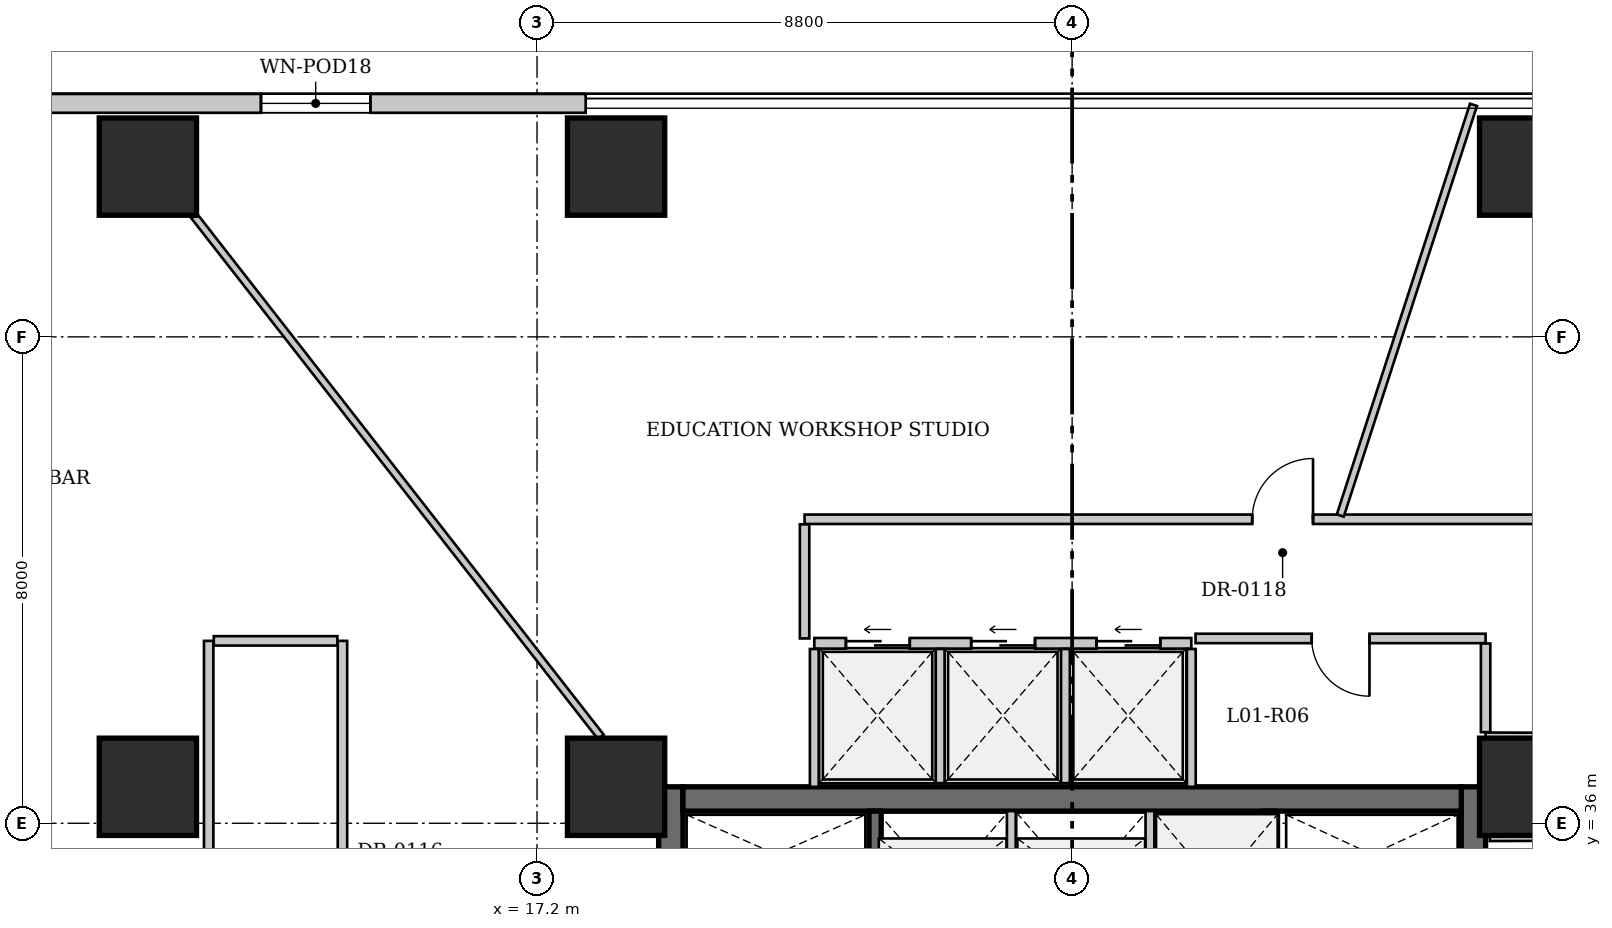
"""IFC4 building model, lengths in metres.
Left out: names, types, materials, properties, quantities, classifications, styles, units other than length and angle.
Written with IfcOpenShell. Run it as: python <this file> out.ifc"""

import sys

from ifc_helpers import new_model, si_unit, direction, frame, frame_2d, origin, origin_2d, place, context, subcontext, project, spatial, rectangle, extrude, source, transform, mapped, element, fill, save


model = new_model("IFC4")
c1 = context("Model", 3, precision=1e-05, world=origin(), true_north=direction((0.0, 1.0)))
c2 = subcontext(c1, "Body", "Model", "MODEL_VIEW")
j1 = project(units=[si_unit("LENGTHUNIT", "METRE"), si_unit("PLANEANGLEUNIT", "RADIAN")], contexts=[c1])
p1 = place(None, origin())
s1 = spatial("IfcSite", under=j1, at=p1, CompositionType="ELEMENT")
p2 = place(p1, origin())
s2 = spatial("IfcBuilding", under=s1, at=p2, CompositionType="ELEMENT")
p3 = place(p2, frame((0.0, 0.0, 5.2)))
s3 = spatial("IfcBuildingStorey", under=s2, at=p3, CompositionType="ELEMENT", Elevation=5.2)
for number, where, z_axis, x_axis in (
    (1, (10.8, 46.8, 0.0), (0.0, 0.0, 1.0), (1.0, 0.0, 0.0)),
    (2, (18.5, 46.8, 0.0), (0.0, 0.0, 1.0), (1.0, 0.0, 0.0)),
    (3, (33.5, 46.8, 0.0), (0.0, 0.0, 1.0), (1.0, 0.0, 0.0)),
    (4, (10.8, 36.6, 0.0), (0.0, 0.0, 1.0), (1.0, 0.0, 0.0)),
    (5, (18.5, 36.6, 0.0), (0.0, 0.0, 1.0), (1.0, 0.0, 0.0)),
    (6, (33.5, 36.6, 0.0), (0.0, 0.0, 1.0), (1.0, 0.0, 0.0)),
):
    element("IfcColumn", number, at=place(p3, frame(where, z_axis=z_axis, x_axis=x_axis)), inside=s3, PredefinedType="COLUMN", context=c2, shape_type="SweptSolid", body=[
        extrude(rectangle(XDim=1.6, YDim=1.6, at=origin_2d()), origin(), (0.0, 0.0, 1.0), 4.3),
    ])
p4 = place(p3, frame((0.16, 47.84, 0.0), z_axis=(0.0, 0.0, 1.0), x_axis=(1.0, 0.0, 0.0)))
e7 = element("IfcWall", 7, at=p4, inside=s3, PredefinedType="SOLIDWALL", context=c2, shape_type="SweptSolid", body=[
    extrude(rectangle(XDim=17.84, YDim=0.31, at=frame_2d((8.92, 0.0))), origin(), (0.0, 0.0, 1.0), 4.05),
])
p5 = place(p4, frame((7.0, 0.0, 0.95)))
e8 = element("IfcOpeningElement", 8, at=p5, cuts=e7, PredefinedType="OPENING", context=c2, shape_type="SweptSolid", body=[
    extrude(rectangle(XDim=1.8, YDim=2.4, at=frame_2d((0.9, 1.2))), frame((0.0, 0.165, 0.0), z_axis=(0.0, -1.0, 0.0), x_axis=(1.0, 0.0, 0.0)), (0.0, 0.0, 1.0), 0.33),
])
p6 = place(p4, frame((12.5, 0.0, 0.95)))
e9 = element("IfcOpeningElement", 9, at=p6, cuts=e7, PredefinedType="OPENING", context=c2, shape_type="SweptSolid", body=[
    extrude(rectangle(XDim=1.8, YDim=2.4, at=frame_2d((0.9, 1.2))), frame((0.0, 0.165, 0.0), z_axis=(0.0, -1.0, 0.0), x_axis=(1.0, 0.0, 0.0)), (0.0, 0.0, 1.0), 0.33),
])
p7 = place(p3, frame((19.4, 25.8, 0.0), z_axis=(0.0, 0.0, 1.0), x_axis=(0.0, 1.0, 0.0)))
e10 = element("IfcWall", 10, at=p7, inside=s3, PredefinedType="SHEAR", context=c2, shape_type="SweptSolid", body=[
    extrude(rectangle(XDim=10.8, YDim=0.4, at=frame_2d((5.4, 0.0))), origin(), (0.0, 0.0, 1.0), 4.6),
])
p8 = place(p3, frame((32.6, 36.6, 0.0), z_axis=(0.0, 0.0, 1.0), x_axis=(0.0, -1.0, 0.0)))
e11 = element("IfcWall", 11, at=p8, inside=s3, PredefinedType="SHEAR", context=c2, shape_type="SweptSolid", body=[
    extrude(rectangle(XDim=10.8, YDim=0.4, at=frame_2d((5.4, 0.0))), origin(), (0.0, 0.0, 1.0), 4.6),
])
p9 = place(p8, frame((3.7, 0.0, 0.0)))
e12 = element("IfcOpeningElement", 12, at=p9, cuts=e11, PredefinedType="OPENING", context=c2, shape_type="SweptSolid", body=[
    extrude(rectangle(XDim=1.05, YDim=2.15, at=frame_2d((0.525, 1.075))), frame((0.0, 0.21, 0.0), z_axis=(0.0, -1.0, 0.0), x_axis=(1.0, 0.0, 0.0)), (0.0, 0.0, 1.0), 0.42),
])
p10 = place(p3, frame((19.6, 36.4, 0.0), z_axis=(0.0, 0.0, 1.0), x_axis=(1.0, 0.0, 0.0)))
e13 = element("IfcWall", 13, at=p10, inside=s3, PredefinedType="SHEAR", context=c2, shape_type="SweptSolid", body=[
    extrude(rectangle(XDim=12.8, YDim=0.4, at=frame_2d((6.4, 0.0))), origin(), (0.0, 0.0, 1.0), 4.6),
])
p11 = place(p3, frame((22.76, 26.2, 0.0), z_axis=(0.0, 0.0, 1.0), x_axis=(0.0, 1.0, 0.0)))
e14 = element("IfcWall", 14, at=p11, inside=s3, PredefinedType="SHEAR", context=c2, shape_type="SweptSolid", body=[
    extrude(rectangle(XDim=10.0, YDim=0.2, at=frame_2d((5.0, 0.0))), origin(), (0.0, 0.0, 1.0), 4.6),
])
p12 = place(p3, frame((29.24, 26.2, 0.0), z_axis=(0.0, 0.0, 1.0), x_axis=(0.0, 1.0, 0.0)))
e15 = element("IfcWall", 15, at=p12, inside=s3, PredefinedType="SHEAR", context=c2, shape_type="SweptSolid", body=[
    extrude(rectangle(XDim=10.0, YDim=0.2, at=frame_2d((5.0, 0.0))), origin(), (0.0, 0.0, 1.0), 4.6),
])
p13 = place(p12, frame((5.65, 0.0, 0.0)))
e16 = element("IfcOpeningElement", 16, at=p13, cuts=e15, PredefinedType="OPENING", context=c2, shape_type="SweptSolid", body=[
    extrude(rectangle(XDim=1.05, YDim=2.15, at=frame_2d((0.525, 1.075))), frame((0.0, 0.11, 0.0), z_axis=(0.0, -1.0, 0.0), x_axis=(1.0, 0.0, 0.0)), (0.0, 0.0, 1.0), 0.22),
])
for number, where, z_axis, x_axis in (
    (17, (25.0, 33.743, 0.0), (0.0, 0.0, 1.0), (0.0, 1.0, 0.0)),
    (18, (27.28, 33.743, 0.0), (0.0, 0.0, 1.0), (0.0, 1.0, 0.0)),
):
    element("IfcWall", number, at=place(p3, frame(where, z_axis=z_axis, x_axis=x_axis)), inside=s3, PredefinedType="SOLIDWALL", context=c2, shape_type="SweptSolid", body=[
        extrude(rectangle(XDim=2.457, YDim=0.145, at=frame_2d((1.228, 0.0))), origin(), (0.0, 0.0, 1.0), 4.3),
    ])
p14 = place(p3, frame((21.76, 38.96, 0.0), z_axis=(0.0, 0.0, 1.0), x_axis=(1.0, 0.0, 0.0)))
e19 = element("IfcWall", 19, at=p14, inside=s3, PredefinedType="SOLIDWALL", context=c2, shape_type="SweptSolid", body=[
    extrude(rectangle(XDim=6.2, YDim=0.175, at=frame_2d((3.1, 0.0))), origin(), (0.0, 0.0, 1.0), 4.3),
])
p15 = place(p14, frame((0.52, 0.0, 0.0)))
e20 = element("IfcOpeningElement", 20, at=p15, cuts=e19, PredefinedType="OPENING", context=c2, shape_type="SweptSolid", body=[
    extrude(rectangle(XDim=1.05, YDim=2.15, at=frame_2d((0.525, 1.075))), frame((0.0, 0.098, 0.0), z_axis=(0.0, -1.0, 0.0), x_axis=(1.0, 0.0, 0.0)), (0.0, 0.0, 1.0), 0.195),
])
p16 = place(p14, frame((2.58, 0.0, 0.0)))
e21 = element("IfcOpeningElement", 21, at=p16, cuts=e19, PredefinedType="OPENING", context=c2, shape_type="SweptSolid", body=[
    extrude(rectangle(XDim=1.05, YDim=2.15, at=frame_2d((0.525, 1.075))), frame((0.0, 0.098, 0.0), z_axis=(0.0, -1.0, 0.0), x_axis=(1.0, 0.0, 0.0)), (0.0, 0.0, 1.0), 0.195),
])
p17 = place(p14, frame((4.64, 0.0, 0.0)))
e22 = element("IfcOpeningElement", 22, at=p17, cuts=e19, PredefinedType="OPENING", context=c2, shape_type="SweptSolid", body=[
    extrude(rectangle(XDim=1.05, YDim=2.15, at=frame_2d((0.525, 1.075))), frame((0.0, 0.098, 0.0), z_axis=(0.0, -1.0, 0.0), x_axis=(1.0, 0.0, 0.0)), (0.0, 0.0, 1.0), 0.195),
])
for number, where, z_axis, x_axis in (
    (23, (21.76, 36.6, 0.0), (0.0, 0.0, 1.0), (0.0, 1.0, 0.0)),
    (24, (27.96, 36.6, 0.0), (0.0, 0.0, 1.0), (0.0, 1.0, 0.0)),
):
    element("IfcWall", number, at=place(p3, frame(where, z_axis=z_axis, x_axis=x_axis)), inside=s3, PredefinedType="SOLIDWALL", context=c2, shape_type="SweptSolid", body=[
        extrude(rectangle(XDim=2.266, YDim=0.145, at=frame_2d((1.133, 0.0))), origin(), (0.0, 0.0, 1.0), 4.3),
    ])
for number, where, z_axis, x_axis in (
    (25, (23.83, 36.66, 0.0), (0.0, 0.0, 1.0), (0.0, 1.0, 0.0)),
    (26, (25.89, 36.66, 0.0), (0.0, 0.0, 1.0), (0.0, 1.0, 0.0)),
):
    element("IfcWall", number, at=place(p3, frame(where, z_axis=z_axis, x_axis=x_axis)), inside=s3, PredefinedType="SOLIDWALL", context=c2, shape_type="SweptSolid", body=[
        extrude(rectangle(XDim=2.207, YDim=0.145, at=frame_2d((1.103, 0.0))), origin(), (0.0, 0.0, 1.0), 4.3),
    ])
p18 = place(p3, frame((14.0, 39.0, 0.0), z_axis=(0.0, 0.0, 1.0), x_axis=(0.0, -1.0, 0.0)))
e27 = element("IfcWall", 27, at=p18, inside=s3, PredefinedType="PARTITIONING", context=c2, shape_type="SweptSolid", body=[
    extrude(rectangle(XDim=12.88, YDim=0.155, at=frame_2d((6.44, 0.0))), origin(), (0.0, 0.0, 1.0), 4.3),
])
p19 = place(p18, frame((4.477, 0.0, 0.0)))
e28 = element("IfcOpeningElement", 28, at=p19, cuts=e27, PredefinedType="OPENING", context=c2, shape_type="SweptSolid", body=[
    extrude(rectangle(XDim=1.0, YDim=2.15, at=frame_2d((0.5, 1.075))), frame((0.0, 0.087, 0.0), z_axis=(0.0, -1.0, 0.0), x_axis=(1.0, 0.0, 0.0)), (0.0, 0.0, 1.0), 0.175),
])
p20 = place(p3, frame((32.8, 39.04, 0.0), z_axis=(0.0, 0.0, 1.0), x_axis=(-1.0, 0.0, 0.0)))
e29 = element("IfcWall", 29, at=p20, inside=s3, PredefinedType="PARTITIONING", context=c2, shape_type="SweptSolid", body=[
    extrude(rectangle(XDim=4.77, YDim=0.155, at=frame_2d((2.385, 0.0))), origin(), (0.0, 0.0, 1.0), 4.3),
])
p21 = place(p20, frame((1.91, 0.0, 0.0)))
e30 = element("IfcOpeningElement", 30, at=p21, cuts=e29, PredefinedType="OPENING", context=c2, shape_type="SweptSolid", body=[
    extrude(rectangle(XDim=0.95, YDim=2.15, at=frame_2d((0.475, 1.075))), frame((0.0, 0.087, 0.0), z_axis=(0.0, -1.0, 0.0), x_axis=(1.0, 0.0, 0.0)), (0.0, 0.0, 1.0), 0.175),
])
p22 = place(p3, frame((21.6, 41.0, 0.0), z_axis=(0.0, 0.0, 1.0), x_axis=(1.0, 0.0, 0.0)))
e31 = element("IfcWall", 31, at=p22, inside=s3, PredefinedType="PARTITIONING", context=c2, shape_type="SweptSolid", body=[
    extrude(rectangle(XDim=14.2, YDim=0.155, at=frame_2d((7.1, 0.0))), origin(), (0.0, 0.0, 1.0), 4.3),
])
p23 = place(p22, frame((7.362, 0.0, 0.0)))
e32 = element("IfcOpeningElement", 32, at=p23, cuts=e31, PredefinedType="OPENING", context=c2, shape_type="SweptSolid", body=[
    extrude(rectangle(XDim=1.0, YDim=2.15, at=frame_2d((0.5, 1.075))), frame((0.0, 0.087, 0.0), z_axis=(0.0, -1.0, 0.0), x_axis=(1.0, 0.0, 0.0)), (0.0, 0.0, 1.0), 0.175),
])
p24 = place(p3, frame((11.8, 26.12, 0.0), z_axis=(0.0, 0.0, 1.0), x_axis=(0.0, 1.0, 0.0)))
e33 = element("IfcWall", 33, at=p24, inside=s3, PredefinedType="PARTITIONING", context=c2, shape_type="SweptSolid", body=[
    extrude(rectangle(XDim=12.88, YDim=0.155, at=frame_2d((6.44, 0.0))), origin(), (0.0, 0.0, 1.0), 4.3),
])
p25 = place(p3, frame((11.884, 39.0, 0.0), z_axis=(0.0, 0.0, 1.0), x_axis=(1.0, 0.0, 0.0)))
e34 = element("IfcWall", 34, at=p25, inside=s3, PredefinedType="PARTITIONING", context=c2, shape_type="SweptSolid", body=[
    extrude(rectangle(XDim=2.033, YDim=0.155, at=frame_2d((1.017, 0.0))), origin(), (0.0, 0.0, 1.0), 4.3),
])
p26 = place(p3, frame((32.87, 35.785, 0.0), z_axis=(0.0, 0.0, 1.0), x_axis=(0.99999584892, 0.002881343971, 0.0)))
e35 = element("IfcWall", 35, at=p26, inside=s3, PredefinedType="PARTITIONING", context=c2, shape_type="SweptSolid", body=[
    extrude(rectangle(XDim=1.44, YDim=0.155, at=frame_2d((0.72, 0.0))), origin(), (0.0, 0.0, 1.0), 4.3),
])
p27 = place(p3, frame((34.228, 37.41, 0.0), z_axis=(0.0, 0.0, 1.0), x_axis=(-0.999993554729, 0.003590334185, 0.0)))
e36 = element("IfcWall", 36, at=p27, inside=s3, PredefinedType="PARTITIONING", context=c2, shape_type="SweptSolid", body=[
    extrude(rectangle(XDim=1.428, YDim=0.155, at=frame_2d((0.714, 0.0))), origin(), (0.0, 0.0, 1.0), 4.3),
])
p28 = place(p3, frame((32.8, 37.499, 0.0), z_axis=(0.0, 0.0, 1.0), x_axis=(0.0, 1.0, 0.0)))
e37 = element("IfcWall", 37, at=p28, inside=s3, PredefinedType="PARTITIONING", context=c2, shape_type="SweptSolid", body=[
    extrude(rectangle(XDim=1.458, YDim=0.155, at=frame_2d((0.729, 0.0))), origin(), (0.0, 0.0, 1.0), 4.3),
])
p29 = place(p3, frame((21.6, 39.04, 0.0), z_axis=(0.0, 0.0, 1.0), x_axis=(0.0, 1.0, 0.0)))
e38 = element("IfcWall", 38, at=p29, inside=s3, PredefinedType="PARTITIONING", context=c2, shape_type="SweptSolid", body=[
    extrude(rectangle(XDim=1.876, YDim=0.155, at=frame_2d((0.938, 0.0))), origin(), (0.0, 0.0, 1.0), 4.3),
])
p30 = place(p3, frame((30.41, 41.062, 0.0), z_axis=(0.0, 0.0, 1.0), x_axis=(0.308512265312, 0.951220364664, 0.0)))
e39 = element("IfcWall", 39, at=p30, inside=s3, PredefinedType="PARTITIONING", context=c2, shape_type="SweptSolid", body=[
    extrude(rectangle(XDim=7.101, YDim=0.12, at=frame_2d((3.55, 0.0))), origin(), (0.0, 0.0, 1.0), 4.3),
])
p31 = place(p3, frame((18.25, 37.42, 0.0), z_axis=(0.0, 0.0, 1.0), x_axis=(-0.615334161376, 0.788266369855, 0.0)))
e40 = element("IfcWall", 40, at=p31, inside=s3, PredefinedType="PARTITIONING", context=c2, shape_type="SweptSolid", body=[
    extrude(rectangle(XDim=10.872, YDim=0.12, at=frame_2d((5.436, 0.0))), origin(), (0.0, 0.0, 1.0), 4.3),
])
m1 = source(origin(), c2, "Body", "SweptSolid", [
    extrude(rectangle(XDim=1.8, YDim=2.4, at=frame_2d((0.9, 1.2))), frame((0.0, 0.03, 0.0), z_axis=(0.0, -1.0, 0.0), x_axis=(1.0, 0.0, 0.0)), (0.0, 0.0, 1.0), 0.06),
])
p32 = place(p6, origin())
e41 = element("IfcWindow", 41, at=p32, inside=s3, PartitioningType="SINGLE_PANEL", PredefinedType="WINDOW", context=c2, shape_type="MappedRepresentation", body=[
    mapped(m1, transform((0.0, 0.0, 0.0), x_axis=(1.0, 0.0, 0.0), y_axis=(0.0, 1.0, 0.0), z_axis=(0.0, 0.0, 1.0), scale=1.0)),
])
fill(e9, e41)
m2 = source(origin(), c2, "Body", "SweptSolid", [
    extrude(rectangle(XDim=1.05, YDim=2.15, at=frame_2d((0.525, 1.075))), frame((0.0, 0.025, 0.0), z_axis=(0.0, -1.0, 0.0), x_axis=(1.0, 0.0, 0.0)), (0.0, 0.0, 1.0), 0.05),
])
p33 = place(p15, origin())
e42 = element("IfcDoor", 42, at=p33, inside=s3, OperationType="SLIDING_TO_LEFT", PredefinedType="DOOR", context=c2, shape_type="MappedRepresentation", body=[
    mapped(m2, transform((0.0, 0.0, 0.0), x_axis=(1.0, 0.0, 0.0), y_axis=(0.0, 1.0, 0.0), z_axis=(0.0, 0.0, 1.0), scale=1.0)),
])
fill(e20, e42)
p34 = place(p16, origin())
e43 = element("IfcDoor", 43, at=p34, inside=s3, OperationType="SLIDING_TO_LEFT", PredefinedType="DOOR", context=c2, shape_type="MappedRepresentation", body=[
    mapped(m2, transform((0.0, 0.0, 0.0), x_axis=(1.0, 0.0, 0.0), y_axis=(0.0, 1.0, 0.0), z_axis=(0.0, 0.0, 1.0), scale=1.0)),
])
fill(e21, e43)
p35 = place(p17, origin())
e44 = element("IfcDoor", 44, at=p35, inside=s3, OperationType="SLIDING_TO_LEFT", PredefinedType="DOOR", context=c2, shape_type="MappedRepresentation", body=[
    mapped(m2, transform((0.0, 0.0, 0.0), x_axis=(1.0, 0.0, 0.0), y_axis=(0.0, 1.0, 0.0), z_axis=(0.0, 0.0, 1.0), scale=1.0)),
])
fill(e22, e44)
m3 = source(origin(), c2, "Body", "SweptSolid", [
    extrude(rectangle(XDim=0.95, YDim=2.15, at=frame_2d((0.475, 1.075))), frame((0.0, 0.025, 0.0), z_axis=(0.0, -1.0, 0.0), x_axis=(1.0, 0.0, 0.0)), (0.0, 0.0, 1.0), 0.05),
])
p36 = place(p21, origin())
e45 = element("IfcDoor", 45, at=p36, inside=s3, OperationType="SINGLE_SWING_LEFT", PredefinedType="DOOR", context=c2, shape_type="MappedRepresentation", body=[
    mapped(m3, transform((0.0, 0.0, 0.0), x_axis=(1.0, 0.0, 0.0), y_axis=(0.0, 1.0, 0.0), z_axis=(0.0, 0.0, 1.0), scale=1.0)),
])
fill(e30, e45)
m4 = source(origin(), c2, "Body", "SweptSolid", [
    extrude(rectangle(XDim=1.0, YDim=2.15, at=frame_2d((0.5, 1.075))), frame((0.0, 0.025, 0.0), z_axis=(0.0, -1.0, 0.0), x_axis=(1.0, 0.0, 0.0)), (0.0, 0.0, 1.0), 0.05),
])
p37 = place(p23, origin())
e46 = element("IfcDoor", 46, at=p37, inside=s3, OperationType="SINGLE_SWING_RIGHT", PredefinedType="DOOR", context=c2, shape_type="MappedRepresentation", body=[
    mapped(m4, transform((0.0, 0.0, 0.0), x_axis=(1.0, 0.0, 0.0), y_axis=(0.0, 1.0, 0.0), z_axis=(0.0, 0.0, 1.0), scale=1.0)),
])
fill(e32, e46)
save(model, sys.argv[1])
